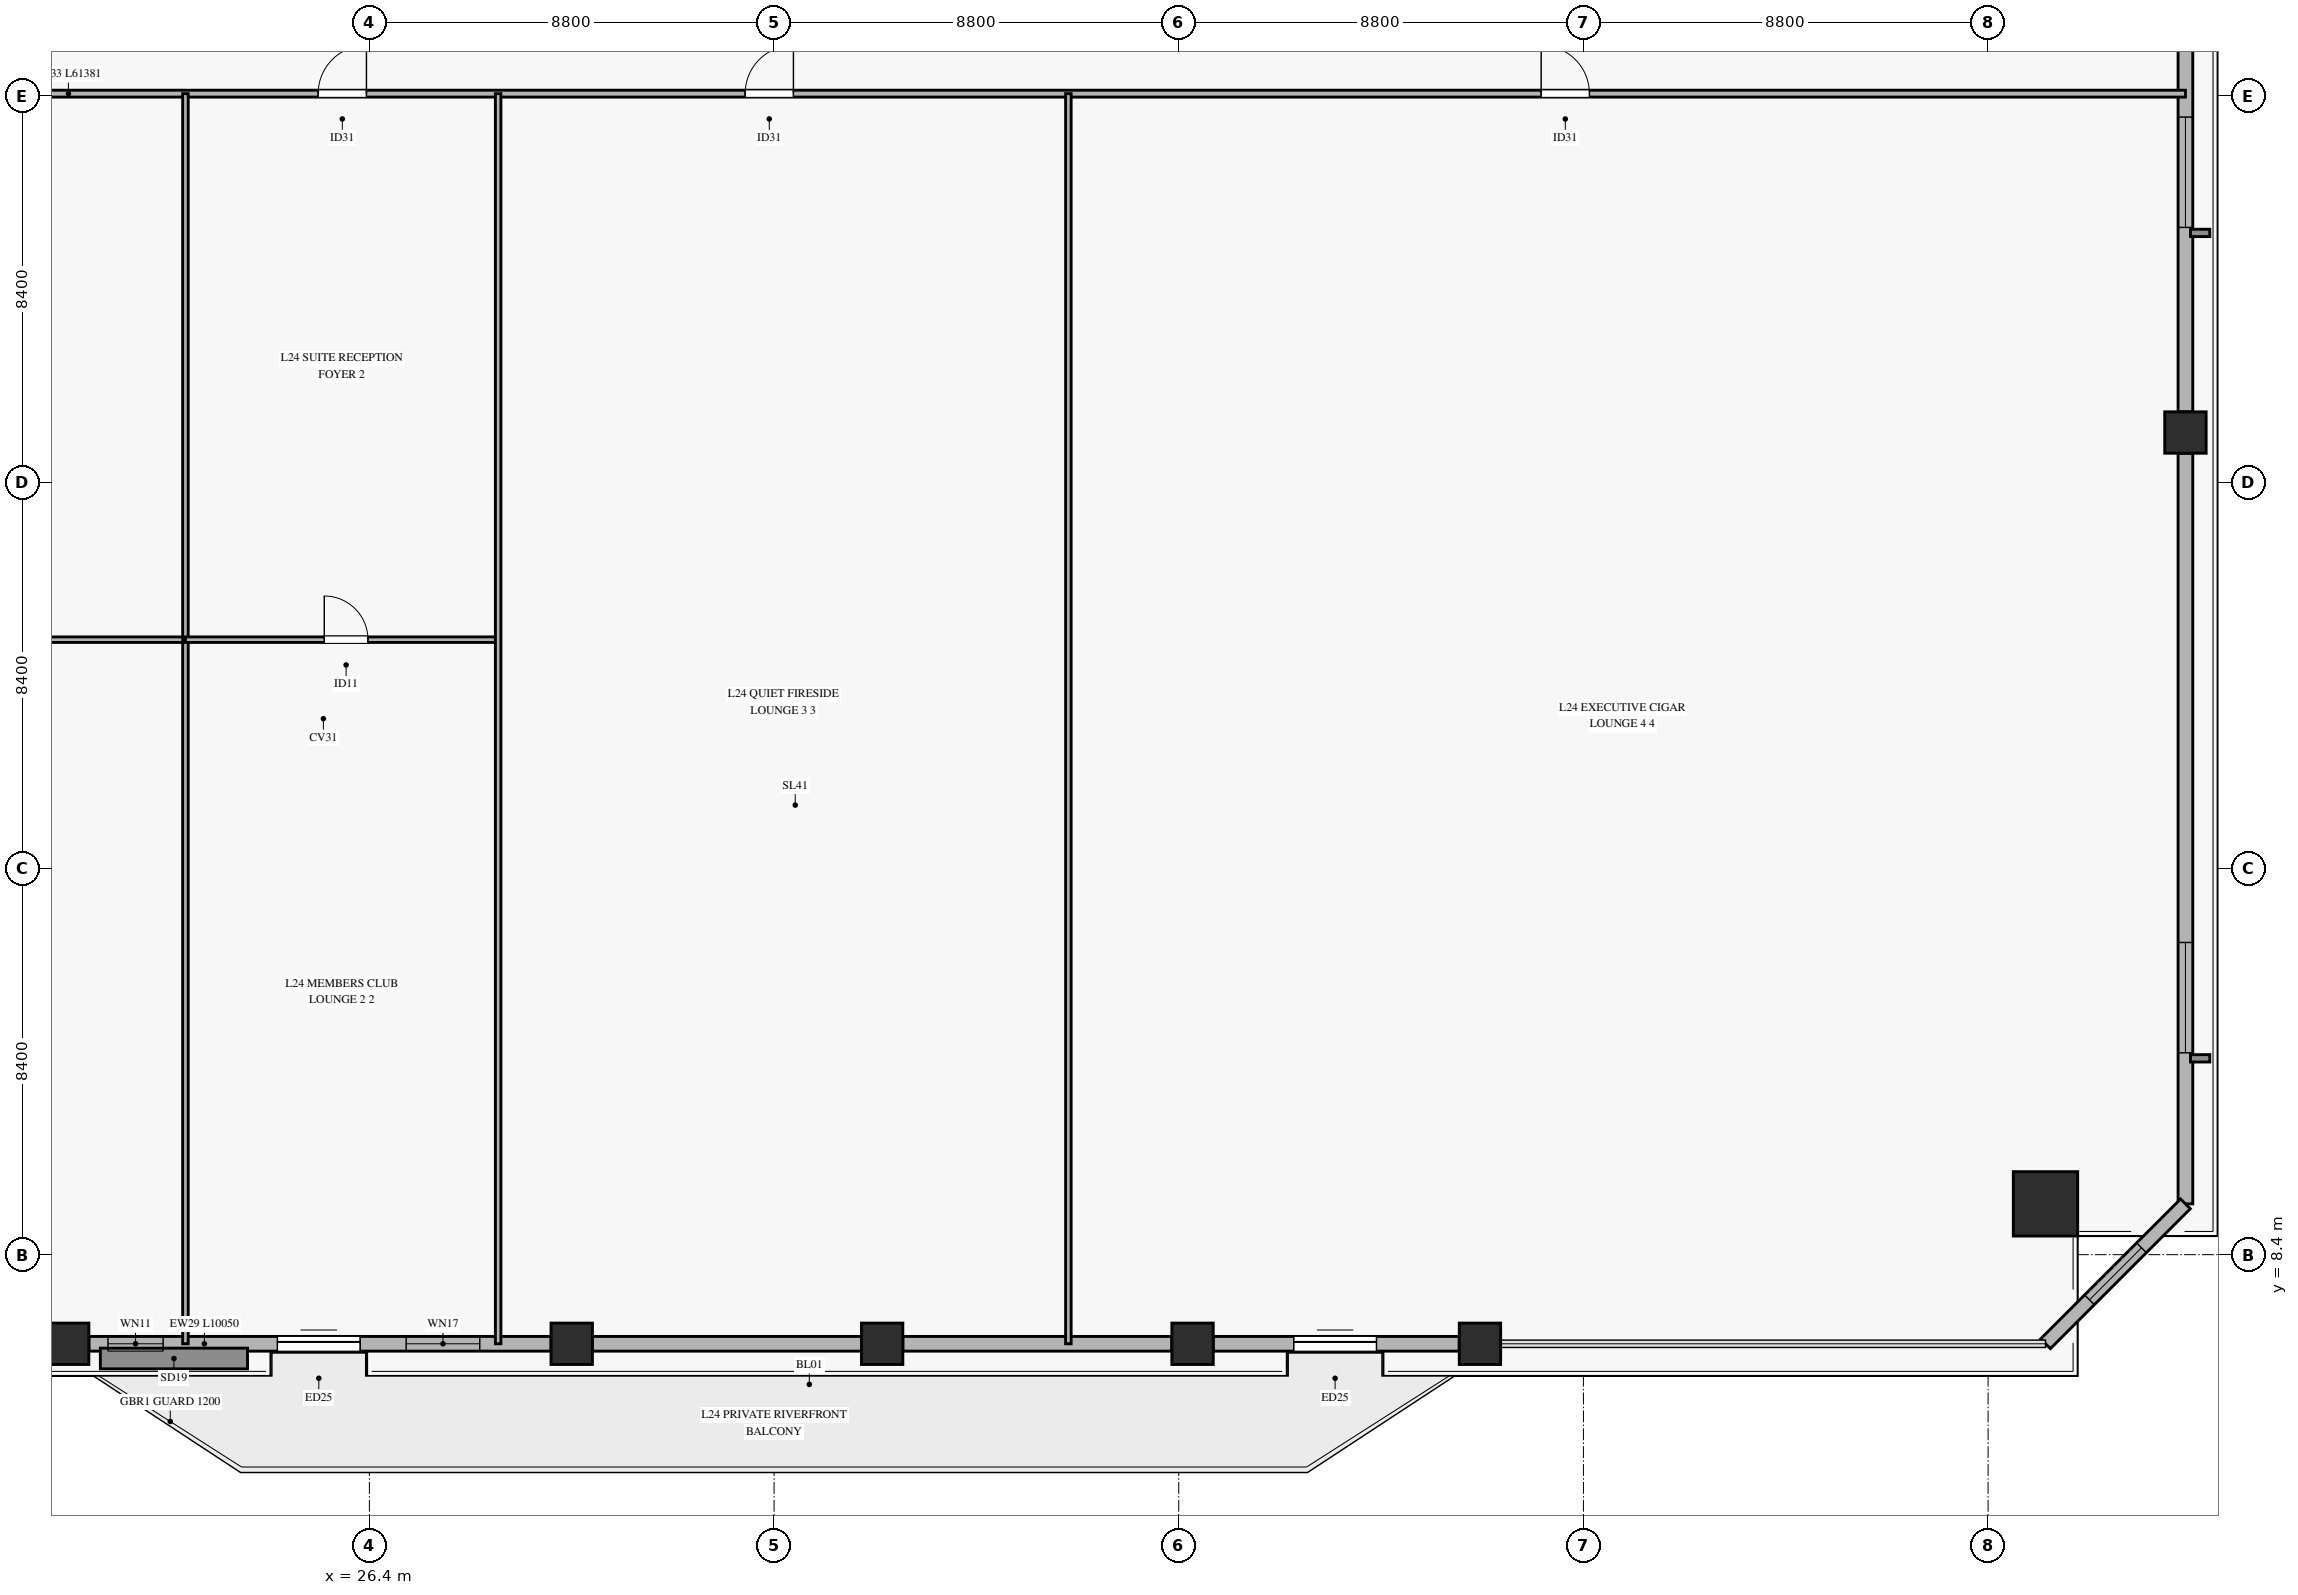
"""IFC4 building model, lengths in metres.
Left out: names, types, materials, properties, quantities, classifications, styles, units other than length and angle.
Written with IfcOpenShell. Run it as: python <this file> out.ifc"""

import sys

from ifc_helpers import new_model, si_unit, direction, frame, frame_2d, origin, origin_2d, place, context, subcontext, project, spatial, rectangle, hollow_rectangle, extrude, source, transform, mapped, element, fill, save


model = new_model("IFC4")
c1 = context("Model", 3, precision=1e-05, world=origin(), true_north=direction((0.0, 1.0)))
c2 = subcontext(c1, "Body", "Model", "MODEL_VIEW")
j1 = project(units=[si_unit("LENGTHUNIT", "METRE"), si_unit("PLANEANGLEUNIT", "RADIAN")], contexts=[c1])
p1 = place(None, origin())
s1 = spatial("IfcSite", under=j1, at=p1, CompositionType="ELEMENT")
p2 = place(p1, origin())
s2 = spatial("IfcBuilding", under=s1, at=p2, CompositionType="ELEMENT")
p3 = place(p2, frame((0.0, 0.0, 99.7)))
s3 = spatial("IfcBuildingStorey", under=s2, at=p3, CompositionType="ELEMENT", Elevation=99.7)
m1 = source(origin(), c2, "Body", "SweptSolid", [
    extrude(hollow_rectangle(XDim=1.4, YDim=1.4, WallThickness=0.065, at=origin_2d()), origin(), (0.0, 0.0, 1.0), 3.68),
])
p4 = place(p3, frame((62.848, 9.505, 0.0), z_axis=(0.0, 0.0, 1.0), x_axis=(1.0, 0.0, 0.0)))
e1 = element("IfcColumn", 1, at=p4, inside=s3, PredefinedType="COLUMN", context=c2, shape_type="MappedRepresentation", body=[
    mapped(m1, transform((0.0, 0.0, 0.0), x_axis=(1.0, 0.0, 0.0), y_axis=(0.0, 1.0, 0.0), z_axis=(0.0, 0.0, 1.0), scale=1.0)),
])
m2 = source(origin(), c2, "Body", "SweptSolid", [
    extrude(hollow_rectangle(XDim=0.9, YDim=0.9, WallThickness=0.04, at=origin_2d()), origin(), (0.0, 0.0, 1.0), 3.68),
])
for number, where, z_axis, x_axis in (
    (2, (19.85, 6.462, 0.0), (0.0, 0.0, 1.0), (1.0, 0.0, 0.0)),
    (3, (30.8, 6.462, 0.0), (0.0, 0.0, 1.0), (1.0, 0.0, 0.0)),
    (4, (37.55, 6.462, 0.0), (0.0, 0.0, 1.0), (1.0, 0.0, 0.0)),
    (5, (44.3, 6.462, 0.0), (0.0, 0.0, 1.0), (1.0, 0.0, 0.0)),
    (6, (50.55, 6.462, 0.0), (0.0, 0.0, 1.0), (1.0, 0.0, 0.0)),
    (7, (65.891, 26.28, 0.0), (0.0, 0.0, 1.0), (1.0, 0.0, 0.0)),
):
    element("IfcColumn", number, at=place(p3, frame(where, z_axis=z_axis, x_axis=x_axis)), inside=s3, PredefinedType="COLUMN", context=c2, shape_type="MappedRepresentation", body=[
        mapped(m2, transform((0.0, 0.0, 0.0), x_axis=(1.0, 0.0, 0.0), y_axis=(0.0, 1.0, 0.0), z_axis=(0.0, 0.0, 1.0), scale=1.0)),
    ])
p5 = place(p3, frame((20.3, 6.462, 0.0), z_axis=(0.0, 0.0, 1.0), x_axis=(1.0, 0.0, 0.0)))
e8 = element("IfcWall", 8, at=p5, inside=s3, PredefinedType="SOLIDWALL", context=c2, shape_type="SweptSolid", body=[
    extrude(rectangle(XDim=10.05, YDim=0.32, at=frame_2d((5.025, 0.0))), origin(), (0.0, 0.0, 1.0), 3.16),
])
p6 = place(p5, frame((4.1, 0.0, 0.0)))
e9 = element("IfcOpeningElement", 9, at=p6, cuts=e8, PredefinedType="OPENING", context=c2, shape_type="SweptSolid", body=[
    extrude(rectangle(XDim=1.8, YDim=2.25, at=frame_2d((0.9, 1.125))), frame((0.0, 0.17, 0.0), z_axis=(0.0, -1.0, 0.0), x_axis=(1.0, 0.0, 0.0)), (0.0, 0.0, 1.0), 0.34),
])
p7 = place(p5, frame((0.415, 0.0, 0.45)))
e10 = element("IfcOpeningElement", 10, at=p7, cuts=e8, PredefinedType="OPENING", context=c2, shape_type="SweptSolid", body=[
    extrude(rectangle(XDim=1.2, YDim=2.0, at=frame_2d((0.6, 1.0))), frame((0.0, 0.17, 0.0), z_axis=(0.0, -1.0, 0.0), x_axis=(1.0, 0.0, 0.0)), (0.0, 0.0, 1.0), 0.34),
])
p8 = place(p5, frame((6.9, 0.0, 0.45)))
e11 = element("IfcOpeningElement", 11, at=p8, cuts=e8, PredefinedType="OPENING", context=c2, shape_type="SweptSolid", body=[
    extrude(rectangle(XDim=1.6, YDim=2.0, at=frame_2d((0.8, 1.0))), frame((0.0, 0.17, 0.0), z_axis=(0.0, -1.0, 0.0), x_axis=(1.0, 0.0, 0.0)), (0.0, 0.0, 1.0), 0.34),
])
for number, where, z_axis, x_axis in (
    (12, (31.25, 6.462, 0.0), (0.0, 0.0, 1.0), (1.0, 0.0, 0.0)),
    (13, (38.0, 6.462, 0.0), (0.0, 0.0, 1.0), (1.0, 0.0, 0.0)),
):
    element("IfcWall", number, at=place(p3, frame(where, z_axis=z_axis, x_axis=x_axis)), inside=s3, PredefinedType="SOLIDWALL", context=c2, shape_type="SweptSolid", body=[
        extrude(rectangle(XDim=5.85, YDim=0.32, at=frame_2d((2.925, 0.0))), origin(), (0.0, 0.0, 1.0), 3.16),
    ])
p9 = place(p3, frame((44.75, 6.462, 0.0), z_axis=(0.0, 0.0, 1.0), x_axis=(1.0, 0.0, 0.0)))
e14 = element("IfcWall", 14, at=p9, inside=s3, PredefinedType="SOLIDWALL", context=c2, shape_type="SweptSolid", body=[
    extrude(rectangle(XDim=5.35, YDim=0.32, at=frame_2d((2.675, 0.0))), origin(), (0.0, 0.0, 1.0), 3.16),
])
p10 = place(p9, frame((1.75, 0.0, 0.0)))
e15 = element("IfcOpeningElement", 15, at=p10, cuts=e14, PredefinedType="OPENING", context=c2, shape_type="SweptSolid", body=[
    extrude(rectangle(XDim=1.8, YDim=2.25, at=frame_2d((0.9, 1.125))), frame((0.0, 0.17, 0.0), z_axis=(0.0, -1.0, 0.0), x_axis=(1.0, 0.0, 0.0)), (0.0, 0.0, 1.0), 0.34),
])
p11 = place(p3, frame((65.891, 9.505, 0.0), z_axis=(0.0, 0.0, 1.0), x_axis=(0.0, 1.0, 0.0)))
e16 = element("IfcWall", 16, at=p11, inside=s3, PredefinedType="SOLIDWALL", context=c2, shape_type="SweptSolid", body=[
    extrude(rectangle(XDim=16.325, YDim=0.32, at=frame_2d((8.163, 0.0))), origin(), (0.0, 0.0, 1.0), 3.16),
])
p12 = place(p11, frame((3.285, 0.0, 0.45)))
e17 = element("IfcOpeningElement", 17, at=p12, cuts=e16, PredefinedType="OPENING", context=c2, shape_type="SweptSolid", body=[
    extrude(rectangle(XDim=2.4, YDim=2.1, at=frame_2d((1.2, 1.05))), frame((0.0, 0.17, 0.0), z_axis=(0.0, -1.0, 0.0), x_axis=(1.0, 0.0, 0.0)), (0.0, 0.0, 1.0), 0.34),
])
p13 = place(p3, frame((65.891, 26.73, 0.0), z_axis=(0.0, 0.0, 1.0), x_axis=(0.0, 1.0, 0.0)))
e18 = element("IfcWall", 18, at=p13, inside=s3, PredefinedType="SOLIDWALL", context=c2, shape_type="SweptSolid", body=[
    extrude(rectangle(XDim=16.326, YDim=0.32, at=frame_2d((8.163, 0.0))), origin(), (0.0, 0.0, 1.0), 3.16),
])
p14 = place(p13, frame((4.011, 0.0, 0.45)))
e19 = element("IfcOpeningElement", 19, at=p14, cuts=e18, PredefinedType="OPENING", context=c2, shape_type="SweptSolid", body=[
    extrude(rectangle(XDim=2.4, YDim=2.1, at=frame_2d((1.2, 1.05))), frame((0.0, 0.17, 0.0), z_axis=(0.0, -1.0, 0.0), x_axis=(1.0, 0.0, 0.0)), (0.0, 0.0, 1.0), 0.34),
])
p15 = place(p3, frame((62.848, 6.462, 0.0), z_axis=(0.0, 0.0, 1.0), x_axis=(0.707135145445, 0.70707841579, 0.0)))
e20 = element("IfcWall", 20, at=p15, inside=s3, PredefinedType="SOLIDWALL", context=c2, shape_type="SweptSolid", body=[
    extrude(rectangle(XDim=4.303, YDim=0.3, at=frame_2d((2.152, 0.0))), origin(), (0.0, 0.0, 1.0), 3.16),
])
p16 = place(p15, frame((1.352, 0.0, 0.45)))
e21 = element("IfcOpeningElement", 21, at=p16, cuts=e20, PredefinedType="OPENING", context=c2, shape_type="SweptSolid", body=[
    extrude(rectangle(XDim=1.6, YDim=2.0, at=frame_2d((0.8, 1.0))), frame((0.0, 0.16, 0.0), z_axis=(0.0, -1.0, 0.0), x_axis=(1.0, 0.0, 0.0)), (0.0, 0.0, 1.0), 0.32),
])
p17 = place(p3, frame((4.51, 33.65, 0.0), z_axis=(0.0, 0.0, 1.0), x_axis=(1.0, 0.0, 0.0)))
e22 = element("IfcWall", 22, at=p17, inside=s3, PredefinedType="PARTITIONING", context=c2, shape_type="SweptSolid", body=[
    extrude(rectangle(XDim=61.381, YDim=0.15, at=frame_2d((30.69, 0.0))), origin(), (0.0, 0.0, 1.0), 2.765),
])
p18 = place(p17, frame((7.442, 0.0, 0.0)))
e23 = element("IfcOpeningElement", 23, at=p18, cuts=e22, PredefinedType="OPENING", context=c2, shape_type="SweptSolid", body=[
    extrude(rectangle(XDim=1.05, YDim=2.15, at=frame_2d((0.525, 1.075))), frame((0.0, 0.085, 0.0), z_axis=(0.0, -1.0, 0.0), x_axis=(1.0, 0.0, 0.0)), (0.0, 0.0, 1.0), 0.17),
])
p19 = place(p17, frame((20.776, 0.0, 0.0)))
e24 = element("IfcOpeningElement", 24, at=p19, cuts=e22, PredefinedType="OPENING", context=c2, shape_type="SweptSolid", body=[
    extrude(rectangle(XDim=1.05, YDim=2.15, at=frame_2d((0.525, 1.075))), frame((0.0, 0.085, 0.0), z_axis=(0.0, -1.0, 0.0), x_axis=(1.0, 0.0, 0.0)), (0.0, 0.0, 1.0), 0.17),
])
p20 = place(p17, frame((30.061, 0.0, 0.0)))
e25 = element("IfcOpeningElement", 25, at=p20, cuts=e22, PredefinedType="OPENING", context=c2, shape_type="SweptSolid", body=[
    extrude(rectangle(XDim=1.05, YDim=2.15, at=frame_2d((0.525, 1.075))), frame((0.0, 0.085, 0.0), z_axis=(0.0, -1.0, 0.0), x_axis=(1.0, 0.0, 0.0)), (0.0, 0.0, 1.0), 0.17),
])
p21 = place(p17, frame((47.371, 0.0, 0.0)))
e26 = element("IfcOpeningElement", 26, at=p21, cuts=e22, PredefinedType="OPENING", context=c2, shape_type="SweptSolid", body=[
    extrude(rectangle(XDim=1.05, YDim=2.15, at=frame_2d((0.525, 1.075))), frame((0.0, 0.085, 0.0), z_axis=(0.0, -1.0, 0.0), x_axis=(1.0, 0.0, 0.0)), (0.0, 0.0, 1.0), 0.17),
])
p22 = place(p3, frame((4.51, 21.775, 0.0), z_axis=(0.0, 0.0, 1.0), x_axis=(1.0, 0.0, 0.0)))
e27 = element("IfcWall", 27, at=p22, inside=s3, PredefinedType="PARTITIONING", context=c2, shape_type="SweptSolid", body=[
    extrude(rectangle(XDim=17.89, YDim=0.12, at=frame_2d((8.945, 0.0))), origin(), (0.0, 0.0, 1.0), 2.765),
])
p23 = place(p22, frame((7.793, 0.0, 0.0)))
e28 = element("IfcOpeningElement", 28, at=p23, cuts=e27, PredefinedType="OPENING", context=c2, shape_type="SweptSolid", body=[
    extrude(rectangle(XDim=0.95, YDim=2.1, at=frame_2d((0.475, 1.05))), frame((0.0, 0.07, 0.0), z_axis=(0.0, -1.0, 0.0), x_axis=(1.0, 0.0, 0.0)), (0.0, 0.0, 1.0), 0.14),
])
p24 = place(p3, frame((22.4, 6.462, 0.0), z_axis=(0.0, 0.0, 1.0), x_axis=(0.0, 1.0, 0.0)))
e29 = element("IfcWall", 29, at=p24, inside=s3, PredefinedType="PARTITIONING", context=c2, shape_type="SweptSolid", body=[
    extrude(rectangle(XDim=27.188, YDim=0.12, at=frame_2d((13.594, 0.0))), origin(), (0.0, 0.0, 1.0), 3.165),
])
p25 = place(p3, frame((22.4, 21.775, 0.0), z_axis=(0.0, 0.0, 1.0), x_axis=(1.0, 0.0, 0.0)))
e30 = element("IfcWall", 30, at=p25, inside=s3, PredefinedType="PARTITIONING", context=c2, shape_type="SweptSolid", body=[
    extrude(rectangle(XDim=6.8, YDim=0.12, at=frame_2d((3.4, 0.0))), origin(), (0.0, 0.0, 1.0), 3.215),
])
p26 = place(p25, frame((3.019, 0.0, 0.0)))
e31 = element("IfcOpeningElement", 31, at=p26, cuts=e30, PredefinedType="OPENING", context=c2, shape_type="SweptSolid", body=[
    extrude(rectangle(XDim=0.95, YDim=2.1, at=frame_2d((0.475, 1.05))), frame((0.0, 0.07, 0.0), z_axis=(0.0, -1.0, 0.0), x_axis=(1.0, 0.0, 0.0)), (0.0, 0.0, 1.0), 0.14),
])
for number, where, z_axis, x_axis in (
    (32, (29.2, 6.462, 0.0), (0.0, 0.0, 1.0), (0.0, 1.0, 0.0)),
    (33, (41.6, 6.462, 0.0), (0.0, 0.0, 1.0), (0.0, 1.0, 0.0)),
):
    element("IfcWall", number, at=place(p3, frame(where, z_axis=z_axis, x_axis=x_axis)), inside=s3, PredefinedType="PARTITIONING", context=c2, shape_type="SweptSolid", body=[
        extrude(rectangle(XDim=27.188, YDim=0.12, at=frame_2d((13.594, 0.0))), origin(), (0.0, 0.0, 1.0), 3.165),
    ])
m3 = source(origin(), c2, "Body", "SweptSolid", [
    extrude(rectangle(XDim=1.8, YDim=2.25, at=frame_2d((0.9, 1.125))), frame((0.0, 0.025, 0.0), z_axis=(0.0, -1.0, 0.0), x_axis=(1.0, 0.0, 0.0)), (0.0, 0.0, 1.0), 0.05),
])
p27 = place(p6, origin())
e34 = element("IfcDoor", 34, at=p27, inside=s3, OperationType="SLIDING_TO_LEFT", PredefinedType="DOOR", context=c2, shape_type="MappedRepresentation", body=[
    mapped(m3, transform((0.0, 0.0, 0.0), x_axis=(1.0, 0.0, 0.0), y_axis=(0.0, 1.0, 0.0), z_axis=(0.0, 0.0, 1.0), scale=1.0)),
])
fill(e9, e34)
m4 = source(origin(), c2, "Body", "SweptSolid", [
    extrude(rectangle(XDim=1.2, YDim=2.0, at=frame_2d((0.6, 1.0))), frame((0.0, 0.03, 0.0), z_axis=(0.0, -1.0, 0.0), x_axis=(1.0, 0.0, 0.0)), (0.0, 0.0, 1.0), 0.06),
])
p28 = place(p7, origin())
e35 = element("IfcWindow", 35, at=p28, inside=s3, PartitioningType="SINGLE_PANEL", PredefinedType="WINDOW", context=c2, shape_type="MappedRepresentation", body=[
    mapped(m4, transform((0.0, 0.0, 0.0), x_axis=(1.0, 0.0, 0.0), y_axis=(0.0, 1.0, 0.0), z_axis=(0.0, 0.0, 1.0), scale=1.0)),
])
fill(e10, e35)
m5 = source(origin(), c2, "Body", "SweptSolid", [
    extrude(rectangle(XDim=1.6, YDim=2.0, at=frame_2d((0.8, 1.0))), frame((0.0, 0.03, 0.0), z_axis=(0.0, -1.0, 0.0), x_axis=(1.0, 0.0, 0.0)), (0.0, 0.0, 1.0), 0.06),
])
p29 = place(p8, origin())
e36 = element("IfcWindow", 36, at=p29, inside=s3, PartitioningType="SINGLE_PANEL", PredefinedType="WINDOW", context=c2, shape_type="MappedRepresentation", body=[
    mapped(m5, transform((0.0, 0.0, 0.0), x_axis=(1.0, 0.0, 0.0), y_axis=(0.0, 1.0, 0.0), z_axis=(0.0, 0.0, 1.0), scale=1.0)),
])
fill(e11, e36)
p30 = place(p10, origin())
e37 = element("IfcDoor", 37, at=p30, inside=s3, OperationType="SLIDING_TO_LEFT", PredefinedType="DOOR", context=c2, shape_type="MappedRepresentation", body=[
    mapped(m3, transform((0.0, 0.0, 0.0), x_axis=(1.0, 0.0, 0.0), y_axis=(0.0, 1.0, 0.0), z_axis=(0.0, 0.0, 1.0), scale=1.0)),
])
fill(e15, e37)
m6 = source(origin(), c2, "Body", "SweptSolid", [
    extrude(rectangle(XDim=2.4, YDim=2.1, at=frame_2d((1.2, 1.05))), frame((0.0, 0.03, 0.0), z_axis=(0.0, -1.0, 0.0), x_axis=(1.0, 0.0, 0.0)), (0.0, 0.0, 1.0), 0.06),
])
p31 = place(p12, origin())
e38 = element("IfcWindow", 38, at=p31, inside=s3, PartitioningType="SINGLE_PANEL", PredefinedType="WINDOW", context=c2, shape_type="MappedRepresentation", body=[
    mapped(m6, transform((0.0, 0.0, 0.0), x_axis=(1.0, 0.0, 0.0), y_axis=(0.0, 1.0, 0.0), z_axis=(0.0, 0.0, 1.0), scale=1.0)),
])
fill(e17, e38)
p32 = place(p14, origin())
e39 = element("IfcWindow", 39, at=p32, inside=s3, PartitioningType="SINGLE_PANEL", PredefinedType="WINDOW", context=c2, shape_type="MappedRepresentation", body=[
    mapped(m6, transform((0.0, 0.0, 0.0), x_axis=(1.0, 0.0, 0.0), y_axis=(0.0, 1.0, 0.0), z_axis=(0.0, 0.0, 1.0), scale=1.0)),
])
fill(e19, e39)
p33 = place(p16, origin())
e40 = element("IfcWindow", 40, at=p33, inside=s3, PartitioningType="SINGLE_PANEL", PredefinedType="WINDOW", context=c2, shape_type="MappedRepresentation", body=[
    mapped(m5, transform((0.0, 0.0, 0.0), x_axis=(1.0, 0.0, 0.0), y_axis=(0.0, 1.0, 0.0), z_axis=(0.0, 0.0, 1.0), scale=1.0)),
])
fill(e21, e40)
m7 = source(origin(), c2, "Body", "SweptSolid", [
    extrude(rectangle(XDim=1.05, YDim=2.15, at=frame_2d((0.525, 1.075))), frame((0.0, 0.025, 0.0), z_axis=(0.0, -1.0, 0.0), x_axis=(1.0, 0.0, 0.0)), (0.0, 0.0, 1.0), 0.05),
])
p34 = place(p19, origin())
e41 = element("IfcDoor", 41, at=p34, inside=s3, OperationType="SINGLE_SWING_RIGHT", PredefinedType="DOOR", context=c2, shape_type="MappedRepresentation", body=[
    mapped(m7, transform((0.0, 0.0, 0.0), x_axis=(1.0, 0.0, 0.0), y_axis=(0.0, 1.0, 0.0), z_axis=(0.0, 0.0, 1.0), scale=1.0)),
])
fill(e24, e41)
m8 = source(origin(), c2, "Body", "SweptSolid", [
    extrude(rectangle(XDim=0.95, YDim=2.1, at=frame_2d((0.475, 1.05))), frame((0.0, 0.025, 0.0), z_axis=(0.0, -1.0, 0.0), x_axis=(1.0, 0.0, 0.0)), (0.0, 0.0, 1.0), 0.05),
])
p35 = place(p26, origin())
e42 = element("IfcDoor", 42, at=p35, inside=s3, OperationType="SINGLE_SWING_LEFT", PredefinedType="DOOR", context=c2, shape_type="MappedRepresentation", body=[
    mapped(m8, transform((0.0, 0.0, 0.0), x_axis=(1.0, 0.0, 0.0), y_axis=(0.0, 1.0, 0.0), z_axis=(0.0, 0.0, 1.0), scale=1.0)),
])
fill(e31, e42)
p36 = place(p20, origin())
e43 = element("IfcDoor", 43, at=p36, inside=s3, OperationType="SINGLE_SWING_RIGHT", PredefinedType="DOOR", context=c2, shape_type="MappedRepresentation", body=[
    mapped(m7, transform((0.0, 0.0, 0.0), x_axis=(1.0, 0.0, 0.0), y_axis=(0.0, 1.0, 0.0), z_axis=(0.0, 0.0, 1.0), scale=1.0)),
])
fill(e25, e43)
p37 = place(p21, origin())
e44 = element("IfcDoor", 44, at=p37, inside=s3, OperationType="SINGLE_SWING_LEFT", PredefinedType="DOOR", context=c2, shape_type="MappedRepresentation", body=[
    mapped(m7, transform((0.0, 0.0, 0.0), x_axis=(1.0, 0.0, 0.0), y_axis=(0.0, 1.0, 0.0), z_axis=(0.0, 0.0, 1.0), scale=1.0)),
])
fill(e26, e44)
save(model, sys.argv[1])
